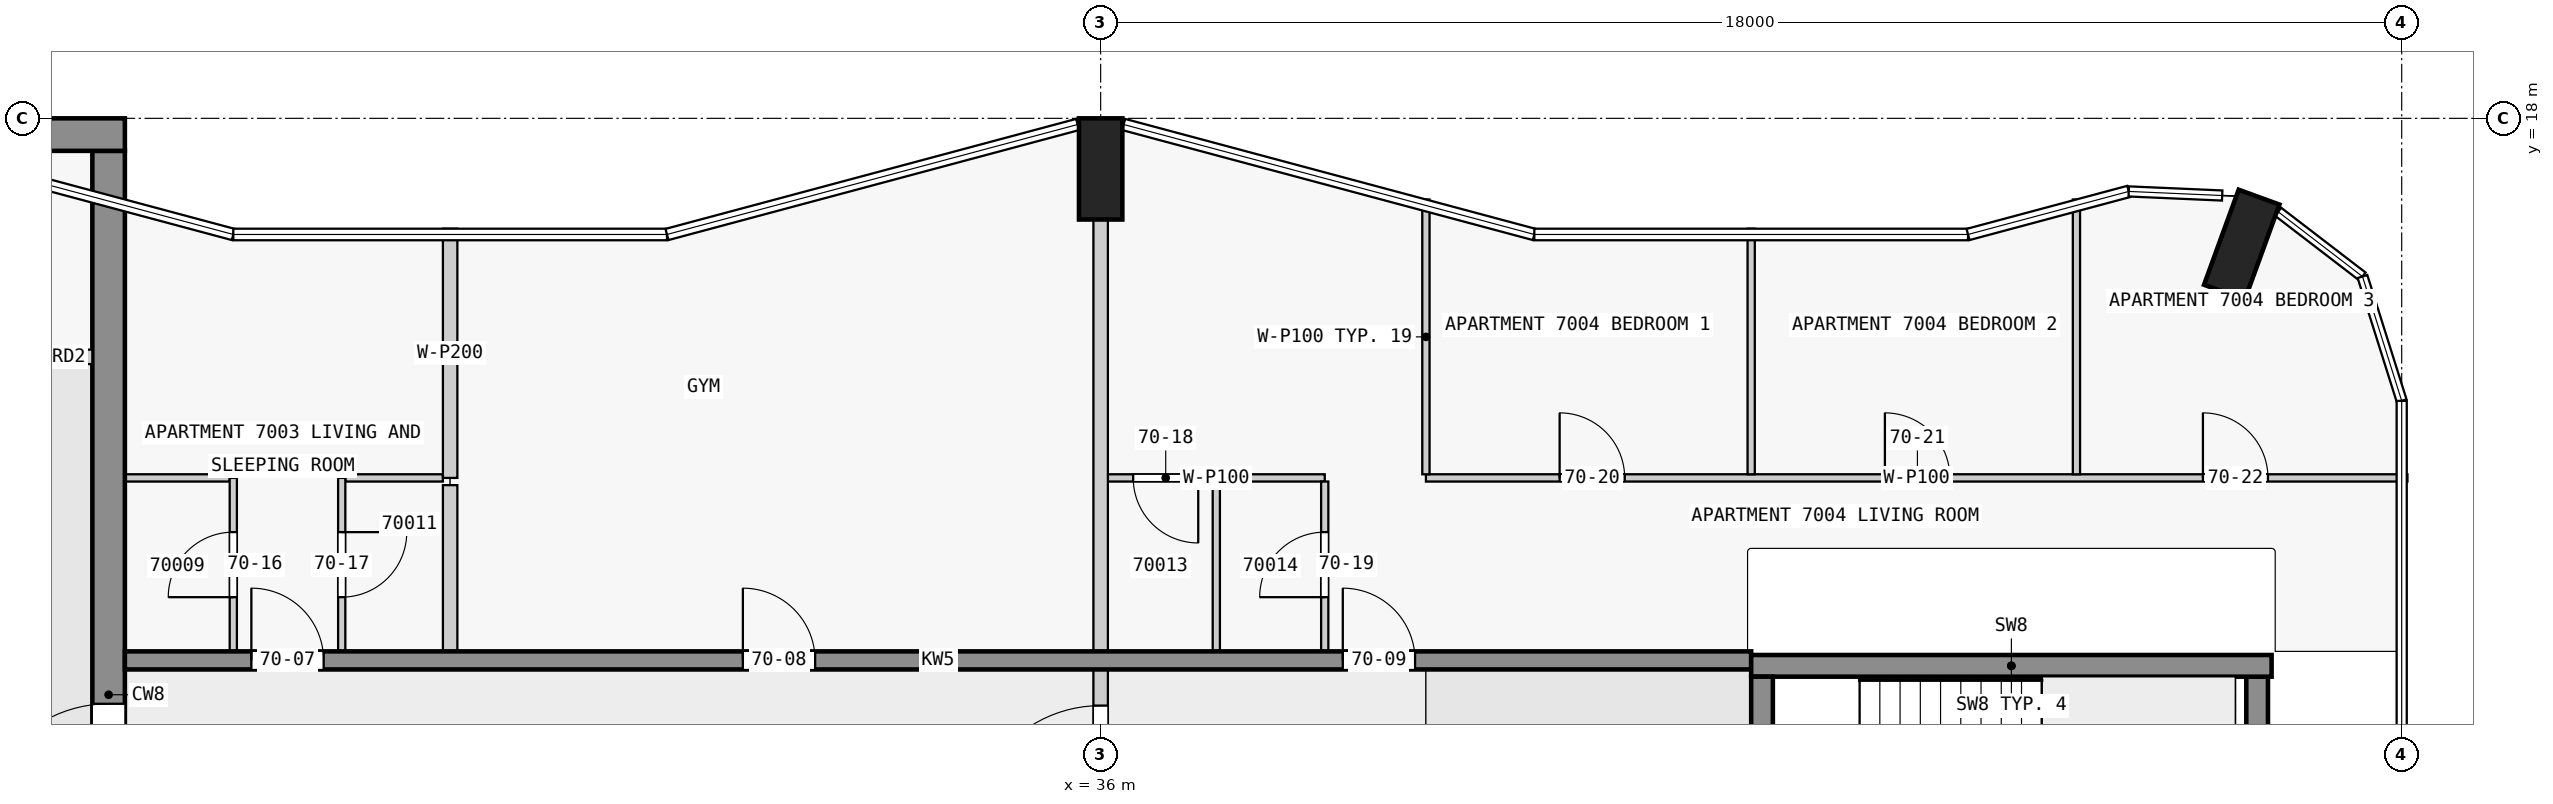
"""IFC4 building model, lengths in metres.
Left out: names, types, materials, properties, quantities, classifications, styles, units other than length and angle.
Written with IfcOpenShell. Run it as: python <this file> out.ifc"""

import sys

from ifc_helpers import new_model, si_unit, direction, frame, frame_2d, origin, origin_2d, place, context, subcontext, project, spatial, rectangle, extrude, element, fill, save


model = new_model("IFC4")
c1 = context("Model", 3, precision=1e-05, world=origin(), true_north=direction((0.0, 1.0)))
c2 = subcontext(c1, "Body", "Model", "MODEL_VIEW")
j1 = project(units=[si_unit("LENGTHUNIT", "METRE"), si_unit("PLANEANGLEUNIT", "RADIAN")], contexts=[c1])
p1 = place(None, origin())
s1 = spatial("IfcSite", under=j1, at=p1, CompositionType="ELEMENT")
p2 = place(p1, origin())
s2 = spatial("IfcBuilding", under=s1, at=p2, CompositionType="ELEMENT")
p3 = place(p2, frame((0.0, 0.0, 266.9)))
s3 = spatial("IfcBuildingStorey", under=s2, at=p3, CompositionType="ELEMENT", Elevation=266.9)
for number, where, z_axis, x_axis in (
    (1, (51.787, 16.252, 0.0), (0.0, 0.0, 1.0), (-0.94, 0.342, 0.0)),
    (2, (36.0, 17.3, 0.0), (0.0, 0.0, 1.0), (1.0, 0.0, 0.0)),
):
    element("IfcColumn", number, at=place(p3, frame(where, z_axis=z_axis, x_axis=x_axis)), inside=s3, PredefinedType="COLUMN", context=c2, shape_type="SweptSolid", body=[
        extrude(rectangle(XDim=0.6, YDim=1.4, at=origin_2d()), origin(), (0.0, 0.0, 1.0), 3.5),
    ])
p4 = place(p3, frame((1.85, 17.775, 0.0), z_axis=(0.0, 0.0, 1.0), x_axis=(1.0, 0.0, 0.0)))
e3 = element("IfcWall", 3, at=p4, inside=s3, PredefinedType="SHEAR", context=c2, shape_type="SweptSolid", body=[
    extrude(rectangle(XDim=20.65, YDim=0.45, at=frame_2d((10.325, 0.0))), origin(), (0.0, 0.0, 1.0), 3.25),
])
p5 = place(p3, frame((22.275, 2.5, 0.0), z_axis=(0.0, 0.0, 1.0), x_axis=(0.0, 1.0, 0.0)))
e4 = element("IfcWall", 4, at=p5, inside=s3, PredefinedType="SHEAR", context=c2, shape_type="SweptSolid", body=[
    extrude(rectangle(XDim=15.05, YDim=0.45, at=frame_2d((7.525, 0.0))), origin(), (0.0, 0.0, 1.0), 3.25),
])
p6 = place(p5, frame((5.6, 0.0, 0.0)))
e5 = element("IfcOpeningElement", 5, at=p6, cuts=e4, PredefinedType="OPENING", context=c2, shape_type="SweptSolid", body=[
    extrude(rectangle(XDim=1.8, YDim=2.1, at=frame_2d((0.9, 1.05))), frame((0.0, 0.235, 0.0), z_axis=(0.0, -1.0, 0.0), x_axis=(1.0, 0.0, 0.0)), (0.0, 0.0, 1.0), 0.47),
])
p7 = place(p3, frame((45.15, 7.725, 0.0), z_axis=(0.0, 0.0, 1.0), x_axis=(0.0, 1.0, 0.0)))
e6 = element("IfcWall", 6, at=p7, inside=s3, PredefinedType="SHEAR", context=c2, shape_type="SweptSolid", body=[
    extrude(rectangle(XDim=2.55, YDim=0.3, at=frame_2d((1.275, 0.0))), origin(), (0.0, 0.0, 1.0), 3.5),
])
p8 = place(p7, frame((0.725, 0.0, 0.0)))
e7 = element("IfcOpeningElement", 7, at=p8, cuts=e6, PredefinedType="OPENING", context=c2, shape_type="SweptSolid", body=[
    extrude(rectangle(XDim=1.1, YDim=2.1, at=frame_2d((0.55, 1.05))), frame((0.0, 0.16, 0.0), z_axis=(0.0, -1.0, 0.0), x_axis=(1.0, 0.0, 0.0)), (0.0, 0.0, 1.0), 0.32),
])
p9 = place(p3, frame((52.0, 7.725, 0.0), z_axis=(0.0, 0.0, 1.0), x_axis=(0.0, 1.0, 0.0)))
e8 = element("IfcWall", 8, at=p9, inside=s3, PredefinedType="SHEAR", context=c2, shape_type="SweptSolid", body=[
    extrude(rectangle(XDim=2.55, YDim=0.3, at=frame_2d((1.275, 0.0))), origin(), (0.0, 0.0, 1.0), 3.5),
])
p10 = place(p3, frame((45.0, 10.425, 0.0), z_axis=(0.0, 0.0, 1.0), x_axis=(1.0, 0.0, 0.0)))
e9 = element("IfcWall", 9, at=p10, inside=s3, PredefinedType="SHEAR", context=c2, shape_type="SweptSolid", body=[
    extrude(rectangle(XDim=7.2, YDim=0.3, at=frame_2d((3.6, 0.0))), origin(), (0.0, 0.0, 1.0), 3.5),
])
p11 = place(p3, frame((22.5, 10.5, 0.0), z_axis=(0.0, 0.0, 1.0), x_axis=(1.0, 0.0, 0.0)))
e10 = element("IfcWall", 10, at=p11, inside=s3, PredefinedType="SHEAR", context=c2, shape_type="SweptSolid", body=[
    extrude(rectangle(XDim=22.5, YDim=0.25, at=frame_2d((11.25, 0.0))), origin(), (0.0, 0.0, 1.0), 3.25),
])
p12 = place(p11, frame((1.75, 0.0, 0.0)))
e11 = element("IfcOpeningElement", 11, at=p12, cuts=e10, PredefinedType="OPENING", context=c2, shape_type="SweptSolid", body=[
    extrude(rectangle(XDim=1.0, YDim=2.1, at=frame_2d((0.5, 1.05))), frame((0.0, 0.135, 0.0), z_axis=(0.0, -1.0, 0.0), x_axis=(1.0, 0.0, 0.0)), (0.0, 0.0, 1.0), 0.27),
])
p13 = place(p11, frame((8.55, 0.0, 0.0)))
e12 = element("IfcOpeningElement", 12, at=p13, cuts=e10, PredefinedType="OPENING", context=c2, shape_type="SweptSolid", body=[
    extrude(rectangle(XDim=1.0, YDim=2.1, at=frame_2d((0.5, 1.05))), frame((0.0, 0.135, 0.0), z_axis=(0.0, -1.0, 0.0), x_axis=(1.0, 0.0, 0.0)), (0.0, 0.0, 1.0), 0.27),
])
p14 = place(p11, frame((16.85, 0.0, 0.0)))
e13 = element("IfcOpeningElement", 13, at=p14, cuts=e10, PredefinedType="OPENING", context=c2, shape_type="SweptSolid", body=[
    extrude(rectangle(XDim=1.0, YDim=2.1, at=frame_2d((0.5, 1.05))), frame((0.0, 0.135, 0.0), z_axis=(0.0, -1.0, 0.0), x_axis=(1.0, 0.0, 0.0)), (0.0, 0.0, 1.0), 0.27),
])
p15 = place(p3, frame((18.6, 14.7, 0.0), z_axis=(0.0, 0.0, 1.0), x_axis=(1.0, 0.0, 0.0)))
e14 = element("IfcWall", 14, at=p15, inside=s3, PredefinedType="PARTITIONING", context=c2, shape_type="SweptSolid", body=[
    extrude(rectangle(XDim=3.45, YDim=0.2, at=frame_2d((1.725, 0.0))), origin(), (0.0, 0.0, 1.0), 3.25),
])
p16 = place(p15, frame((0.15, 0.0, 0.0)))
e15 = element("IfcOpeningElement", 15, at=p16, cuts=e14, PredefinedType="OPENING", context=c2, shape_type="SweptSolid", body=[
    extrude(rectangle(XDim=0.9, YDim=2.1, at=frame_2d((0.45, 1.05))), frame((0.0, 0.11, 0.0), z_axis=(0.0, -1.0, 0.0), x_axis=(1.0, 0.0, 0.0)), (0.0, 0.0, 1.0), 0.22),
])
p17 = place(p15, frame((1.875, 0.0, 0.0)))
e16 = element("IfcOpeningElement", 16, at=p17, cuts=e14, PredefinedType="OPENING", context=c2, shape_type="SweptSolid", body=[
    extrude(rectangle(XDim=0.9, YDim=2.1, at=frame_2d((0.45, 1.05))), frame((0.0, 0.11, 0.0), z_axis=(0.0, -1.0, 0.0), x_axis=(1.0, 0.0, 0.0)), (0.0, 0.0, 1.0), 0.22),
])
p18 = place(p3, frame((23.95, 13.025, 0.0), z_axis=(0.0, 0.0, 1.0), x_axis=(-1.0, 0.0, 0.0)))
e17 = element("IfcWall", 17, at=p18, inside=s3, PredefinedType="PARTITIONING", context=c2, shape_type="SweptSolid", body=[
    extrude(rectangle(XDim=1.45, YDim=0.1, at=frame_2d((0.725, 0.0))), origin(), (0.0, 0.0, 1.0), 3.25),
])
p19 = place(p3, frame((26.9, 13.025, 0.0), z_axis=(0.0, 0.0, 1.0), x_axis=(-1.0, 0.0, 0.0)))
e18 = element("IfcWall", 18, at=p19, inside=s3, PredefinedType="PARTITIONING", context=c2, shape_type="SweptSolid", body=[
    extrude(rectangle(XDim=1.35, YDim=0.1, at=frame_2d((0.675, 0.0))), origin(), (0.0, 0.0, 1.0), 3.25),
])
p20 = place(p3, frame((39.1, 13.025, 0.0), z_axis=(0.0, 0.0, 1.0), x_axis=(-1.0, 0.0, 0.0)))
e19 = element("IfcWall", 19, at=p20, inside=s3, PredefinedType="PARTITIONING", context=c2, shape_type="SweptSolid", body=[
    extrude(rectangle(XDim=3.0, YDim=0.1, at=frame_2d((1.5, 0.0))), origin(), (0.0, 0.0, 1.0), 3.25),
])
p21 = place(p20, frame((1.75, 0.0, 0.0)))
e20 = element("IfcOpeningElement", 20, at=p21, cuts=e19, PredefinedType="OPENING", context=c2, shape_type="SweptSolid", body=[
    extrude(rectangle(XDim=0.9, YDim=2.1, at=frame_2d((0.45, 1.05))), frame((0.0, 0.06, 0.0), z_axis=(0.0, -1.0, 0.0), x_axis=(1.0, 0.0, 0.0)), (0.0, 0.0, 1.0), 0.12),
])
p22 = place(p3, frame((40.5, 13.025, 0.0), z_axis=(0.0, 0.0, 1.0), x_axis=(1.0, 0.0, 0.0)))
e21 = element("IfcWall", 21, at=p22, inside=s3, PredefinedType="PARTITIONING", context=c2, shape_type="SweptSolid", body=[
    extrude(rectangle(XDim=13.58, YDim=0.1, at=frame_2d((6.79, 0.0))), origin(), (0.0, 0.0, 1.0), 3.25),
])
p23 = place(p22, frame((1.85, 0.0, 0.0)))
e22 = element("IfcOpeningElement", 22, at=p23, cuts=e21, PredefinedType="OPENING", context=c2, shape_type="SweptSolid", body=[
    extrude(rectangle(XDim=0.9, YDim=2.1, at=frame_2d((0.45, 1.05))), frame((0.0, 0.06, 0.0), z_axis=(0.0, -1.0, 0.0), x_axis=(1.0, 0.0, 0.0)), (0.0, 0.0, 1.0), 0.12),
])
p24 = place(p22, frame((6.35, 0.0, 0.0)))
e23 = element("IfcOpeningElement", 23, at=p24, cuts=e21, PredefinedType="OPENING", context=c2, shape_type="SweptSolid", body=[
    extrude(rectangle(XDim=0.9, YDim=2.1, at=frame_2d((0.45, 1.05))), frame((0.0, 0.06, 0.0), z_axis=(0.0, -1.0, 0.0), x_axis=(1.0, 0.0, 0.0)), (0.0, 0.0, 1.0), 0.12),
])
p25 = place(p22, frame((10.75, 0.0, 0.0)))
e24 = element("IfcOpeningElement", 24, at=p25, cuts=e21, PredefinedType="OPENING", context=c2, shape_type="SweptSolid", body=[
    extrude(rectangle(XDim=0.9, YDim=2.1, at=frame_2d((0.45, 1.05))), frame((0.0, 0.06, 0.0), z_axis=(0.0, -1.0, 0.0), x_axis=(1.0, 0.0, 0.0)), (0.0, 0.0, 1.0), 0.12),
])
p26 = place(p3, frame((24.0, 10.625, 0.0), z_axis=(0.0, 0.0, 1.0), x_axis=(0.0, 1.0, 0.0)))
e25 = element("IfcWall", 25, at=p26, inside=s3, PredefinedType="PARTITIONING", context=c2, shape_type="SweptSolid", body=[
    extrude(rectangle(XDim=2.4, YDim=0.1, at=frame_2d((1.2, 0.0))), origin(), (0.0, 0.0, 1.0), 3.25),
])
p27 = place(p26, frame((0.75, 0.0, 0.0)))
e26 = element("IfcOpeningElement", 26, at=p27, cuts=e25, PredefinedType="OPENING", context=c2, shape_type="SweptSolid", body=[
    extrude(rectangle(XDim=0.9, YDim=2.1, at=frame_2d((0.45, 1.05))), frame((0.0, 0.06, 0.0), z_axis=(0.0, -1.0, 0.0), x_axis=(1.0, 0.0, 0.0)), (0.0, 0.0, 1.0), 0.12),
])
p28 = place(p3, frame((25.5, 13.025, 0.0), z_axis=(0.0, 0.0, 1.0), x_axis=(0.0, -1.0, 0.0)))
e27 = element("IfcWall", 27, at=p28, inside=s3, PredefinedType="PARTITIONING", context=c2, shape_type="SweptSolid", body=[
    extrude(rectangle(XDim=2.4, YDim=0.1, at=frame_2d((1.2, 0.0))), origin(), (0.0, 0.0, 1.0), 3.25),
])
p29 = place(p28, frame((0.75, 0.0, 0.0)))
e28 = element("IfcOpeningElement", 28, at=p29, cuts=e27, PredefinedType="OPENING", context=c2, shape_type="SweptSolid", body=[
    extrude(rectangle(XDim=0.9, YDim=2.1, at=frame_2d((0.45, 1.05))), frame((0.0, 0.06, 0.0), z_axis=(0.0, -1.0, 0.0), x_axis=(1.0, 0.0, 0.0)), (0.0, 0.0, 1.0), 0.12),
])
p30 = place(p3, frame((27.0, 16.473, 0.0), z_axis=(0.0, 0.0, 1.0), x_axis=(0.0, -1.0, 0.0)))
e29 = element("IfcWall", 29, at=p30, inside=s3, PredefinedType="PARTITIONING", context=c2, shape_type="SweptSolid", body=[
    extrude(rectangle(XDim=3.448, YDim=0.2, at=frame_2d((1.724, 0.0))), origin(), (0.0, 0.0, 1.0), 3.25),
])
p31 = place(p3, frame((27.0, 10.625, 0.0), z_axis=(0.0, 0.0, 1.0), x_axis=(0.0, 1.0, 0.0)))
e30 = element("IfcWall", 30, at=p31, inside=s3, PredefinedType="PARTITIONING", context=c2, shape_type="SweptSolid", body=[
    extrude(rectangle(XDim=2.3, YDim=0.2, at=frame_2d((1.15, 0.0))), origin(), (0.0, 0.0, 1.0), 3.25),
])
p32 = place(p3, frame((36.0, 10.625, 0.0), z_axis=(0.0, 0.0, 1.0), x_axis=(0.0, 1.0, 0.0)))
e31 = element("IfcWall", 31, at=p32, inside=s3, PredefinedType="PARTITIONING", context=c2, shape_type="SweptSolid", body=[
    extrude(rectangle(XDim=5.975, YDim=0.2, at=frame_2d((2.988, 0.0))), origin(), (0.0, 0.0, 1.0), 3.25),
])
p33 = place(p3, frame((37.6, 10.625, 0.0), z_axis=(0.0, 0.0, 1.0), x_axis=(0.0, 1.0, 0.0)))
e32 = element("IfcWall", 32, at=p33, inside=s3, PredefinedType="PARTITIONING", context=c2, shape_type="SweptSolid", body=[
    extrude(rectangle(XDim=2.35, YDim=0.1, at=frame_2d((1.175, 0.0))), origin(), (0.0, 0.0, 1.0), 3.25),
])
p34 = place(p3, frame((39.1, 10.625, 0.0), z_axis=(0.0, 0.0, 1.0), x_axis=(0.0, 1.0, 0.0)))
e33 = element("IfcWall", 33, at=p34, inside=s3, PredefinedType="PARTITIONING", context=c2, shape_type="SweptSolid", body=[
    extrude(rectangle(XDim=2.35, YDim=0.1, at=frame_2d((1.175, 0.0))), origin(), (0.0, 0.0, 1.0), 3.25),
])
p35 = place(p34, frame((0.75, 0.0, 0.0)))
e34 = element("IfcOpeningElement", 34, at=p35, cuts=e33, PredefinedType="OPENING", context=c2, shape_type="SweptSolid", body=[
    extrude(rectangle(XDim=0.9, YDim=2.1, at=frame_2d((0.45, 1.05))), frame((0.0, 0.06, 0.0), z_axis=(0.0, -1.0, 0.0), x_axis=(1.0, 0.0, 0.0)), (0.0, 0.0, 1.0), 0.12),
])
p36 = place(p3, frame((40.5, 16.878, 0.0), z_axis=(0.0, 0.0, 1.0), x_axis=(0.0, -1.0, 0.0)))
e35 = element("IfcWall", 35, at=p36, inside=s3, PredefinedType="PARTITIONING", context=c2, shape_type="SweptSolid", body=[
    extrude(rectangle(XDim=3.803, YDim=0.1, at=frame_2d((1.901, 0.0))), origin(), (0.0, 0.0, 1.0), 3.25),
])
p37 = place(p3, frame((45.0, 13.075, 0.0), z_axis=(0.0, 0.0, 1.0), x_axis=(0.0, 1.0, 0.0)))
e36 = element("IfcWall", 36, at=p37, inside=s3, PredefinedType="PARTITIONING", context=c2, shape_type="SweptSolid", body=[
    extrude(rectangle(XDim=3.398, YDim=0.1, at=frame_2d((1.699, 0.0))), origin(), (0.0, 0.0, 1.0), 3.25),
])
p38 = place(p3, frame((49.5, 13.075, 0.0), z_axis=(0.0, 0.0, 1.0), x_axis=(0.0, 1.0, 0.0)))
e37 = element("IfcWall", 37, at=p38, inside=s3, PredefinedType="PARTITIONING", context=c2, shape_type="SweptSolid", body=[
    extrude(rectangle(XDim=3.803, YDim=0.1, at=frame_2d((1.901, 0.0))), origin(), (0.0, 0.0, 1.0), 3.25),
])
p39 = place(p3, frame((36.0, 7.475, 0.0), z_axis=(0.0, 0.0, 1.0), x_axis=(0.0, 1.0, 0.0)))
e38 = element("IfcWall", 38, at=p39, inside=s3, PredefinedType="PARTITIONING", context=c2, shape_type="SweptSolid", body=[
    extrude(rectangle(XDim=3.05, YDim=0.2, at=frame_2d((1.525, 0.0))), origin(), (0.0, 0.0, 1.0), 3.25),
])
p40 = place(p39, frame((0.6, 0.0, 0.0)))
e39 = element("IfcOpeningElement", 39, at=p40, cuts=e38, PredefinedType="OPENING", context=c2, shape_type="SweptSolid", body=[
    extrude(rectangle(XDim=1.8, YDim=2.1, at=frame_2d((0.9, 1.05))), frame((0.0, 0.11, 0.0), z_axis=(0.0, -1.0, 0.0), x_axis=(1.0, 0.0, 0.0)), (0.0, 0.0, 1.0), 0.22),
])
p41 = place(p6, origin())
e40 = element("IfcDoor", 40, at=p41, inside=s3, OperationType="DOUBLE_DOOR_SINGLE_SWING", PredefinedType="DOOR", context=c2, shape_type="SweptSolid", body=[
    extrude(rectangle(XDim=1.8, YDim=2.1, at=frame_2d((0.9, 1.05))), frame((0.0, 0.025, 0.0), z_axis=(0.0, -1.0, 0.0), x_axis=(1.0, 0.0, 0.0)), (0.0, 0.0, 1.0), 0.05),
])
fill(e5, e40)
p42 = place(p12, origin())
e41 = element("IfcDoor", 41, at=p42, inside=s3, OperationType="SINGLE_SWING_LEFT", PredefinedType="DOOR", context=c2, shape_type="SweptSolid", body=[
    extrude(rectangle(XDim=1.0, YDim=2.1, at=frame_2d((0.5, 1.05))), frame((0.0, 0.025, 0.0), z_axis=(0.0, -1.0, 0.0), x_axis=(1.0, 0.0, 0.0)), (0.0, 0.0, 1.0), 0.05),
])
fill(e11, e41)
p43 = place(p13, origin())
e42 = element("IfcDoor", 42, at=p43, inside=s3, OperationType="SINGLE_SWING_LEFT", PredefinedType="DOOR", context=c2, shape_type="SweptSolid", body=[
    extrude(rectangle(XDim=1.0, YDim=2.1, at=frame_2d((0.5, 1.05))), frame((0.0, 0.025, 0.0), z_axis=(0.0, -1.0, 0.0), x_axis=(1.0, 0.0, 0.0)), (0.0, 0.0, 1.0), 0.05),
])
fill(e12, e42)
p44 = place(p14, origin())
e43 = element("IfcDoor", 43, at=p44, inside=s3, OperationType="SINGLE_SWING_RIGHT", PredefinedType="DOOR", context=c2, shape_type="SweptSolid", body=[
    extrude(rectangle(XDim=1.0, YDim=2.1, at=frame_2d((0.5, 1.05))), frame((0.0, 0.025, 0.0), z_axis=(0.0, -1.0, 0.0), x_axis=(1.0, 0.0, 0.0)), (0.0, 0.0, 1.0), 0.05),
])
fill(e13, e43)
p45 = place(p40, origin())
e44 = element("IfcDoor", 44, at=p45, inside=s3, OperationType="SINGLE_SWING_LEFT", PredefinedType="DOOR", context=c2, shape_type="SweptSolid", body=[
    extrude(rectangle(XDim=1.8, YDim=2.1, at=frame_2d((0.9, 1.05))), frame((0.0, 0.025, 0.0), z_axis=(0.0, -1.0, 0.0), x_axis=(1.0, 0.0, 0.0)), (0.0, 0.0, 1.0), 0.05),
])
fill(e39, e44)
p46 = place(p27, origin())
e45 = element("IfcDoor", 45, at=p46, inside=s3, OperationType="SINGLE_SWING_LEFT", PredefinedType="DOOR", context=c2, shape_type="SweptSolid", body=[
    extrude(rectangle(XDim=0.9, YDim=2.1, at=frame_2d((0.45, 1.05))), frame((0.0, 0.025, 0.0), z_axis=(0.0, -1.0, 0.0), x_axis=(1.0, 0.0, 0.0)), (0.0, 0.0, 1.0), 0.05),
])
fill(e26, e45)
p47 = place(p29, origin())
e46 = element("IfcDoor", 46, at=p47, inside=s3, OperationType="SINGLE_SWING_LEFT", PredefinedType="DOOR", context=c2, shape_type="SweptSolid", body=[
    extrude(rectangle(XDim=0.9, YDim=2.1, at=frame_2d((0.45, 1.05))), frame((0.0, 0.025, 0.0), z_axis=(0.0, -1.0, 0.0), x_axis=(1.0, 0.0, 0.0)), (0.0, 0.0, 1.0), 0.05),
])
fill(e28, e46)
p48 = place(p21, origin())
e47 = element("IfcDoor", 47, at=p48, inside=s3, OperationType="SINGLE_SWING_RIGHT", PredefinedType="DOOR", context=c2, shape_type="SweptSolid", body=[
    extrude(rectangle(XDim=0.9, YDim=2.1, at=frame_2d((0.45, 1.05))), frame((0.0, 0.025, 0.0), z_axis=(0.0, -1.0, 0.0), x_axis=(1.0, 0.0, 0.0)), (0.0, 0.0, 1.0), 0.05),
])
fill(e20, e47)
p49 = place(p35, origin())
e48 = element("IfcDoor", 48, at=p49, inside=s3, OperationType="SINGLE_SWING_RIGHT", PredefinedType="DOOR", context=c2, shape_type="SweptSolid", body=[
    extrude(rectangle(XDim=0.9, YDim=2.1, at=frame_2d((0.45, 1.05))), frame((0.0, 0.025, 0.0), z_axis=(0.0, -1.0, 0.0), x_axis=(1.0, 0.0, 0.0)), (0.0, 0.0, 1.0), 0.05),
])
fill(e34, e48)
p50 = place(p23, origin())
e49 = element("IfcDoor", 49, at=p50, inside=s3, OperationType="SINGLE_SWING_LEFT", PredefinedType="DOOR", context=c2, shape_type="SweptSolid", body=[
    extrude(rectangle(XDim=0.9, YDim=2.1, at=frame_2d((0.45, 1.05))), frame((0.0, 0.025, 0.0), z_axis=(0.0, -1.0, 0.0), x_axis=(1.0, 0.0, 0.0)), (0.0, 0.0, 1.0), 0.05),
])
fill(e22, e49)
p51 = place(p24, origin())
e50 = element("IfcDoor", 50, at=p51, inside=s3, OperationType="SINGLE_SWING_RIGHT", PredefinedType="DOOR", context=c2, shape_type="SweptSolid", body=[
    extrude(rectangle(XDim=0.9, YDim=2.1, at=frame_2d((0.45, 1.05))), frame((0.0, 0.025, 0.0), z_axis=(0.0, -1.0, 0.0), x_axis=(1.0, 0.0, 0.0)), (0.0, 0.0, 1.0), 0.05),
])
fill(e23, e50)
p52 = place(p25, origin())
e51 = element("IfcDoor", 51, at=p52, inside=s3, OperationType="SINGLE_SWING_RIGHT", PredefinedType="DOOR", context=c2, shape_type="SweptSolid", body=[
    extrude(rectangle(XDim=0.9, YDim=2.1, at=frame_2d((0.45, 1.05))), frame((0.0, 0.025, 0.0), z_axis=(0.0, -1.0, 0.0), x_axis=(1.0, 0.0, 0.0)), (0.0, 0.0, 1.0), 0.05),
])
fill(e24, e51)
save(model, sys.argv[1])
